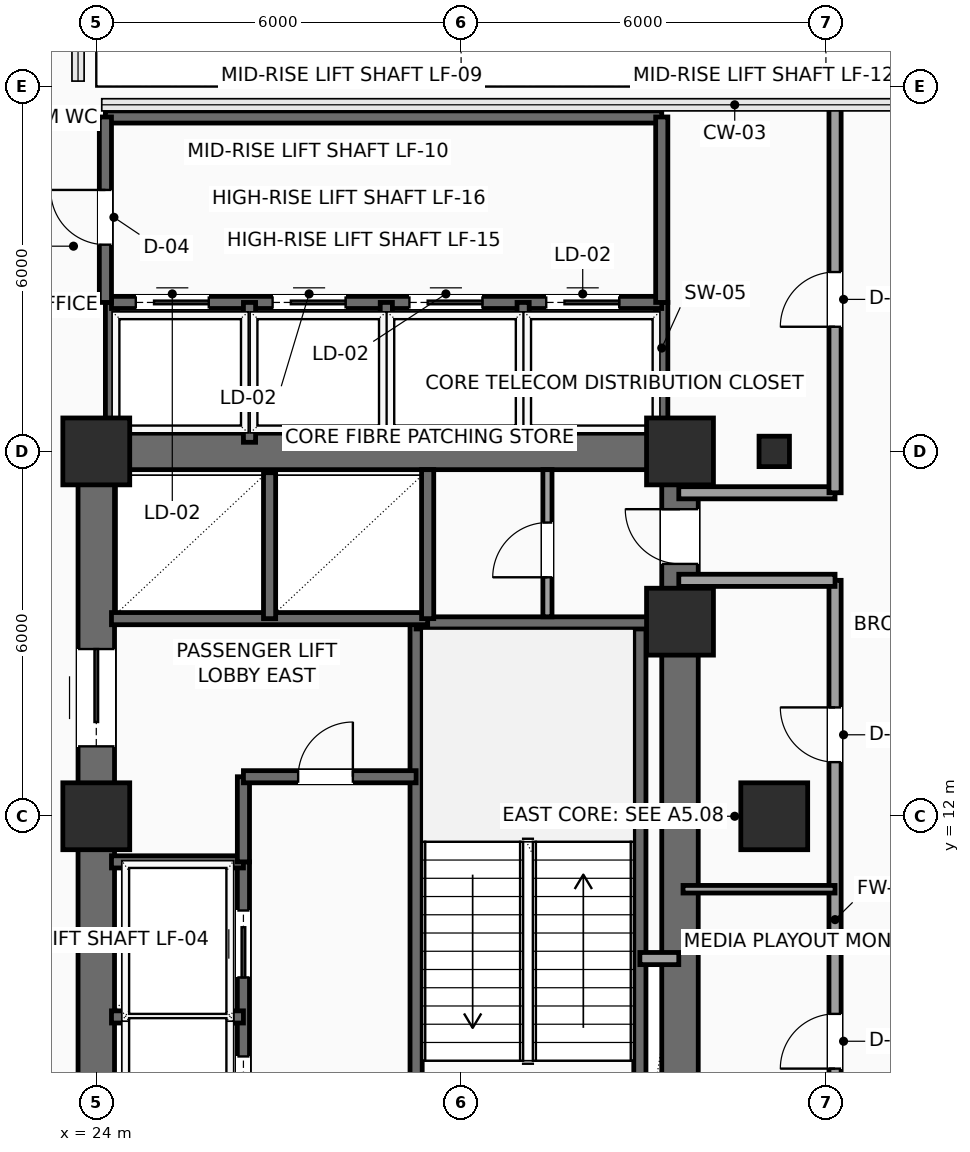
"""IFC4 building model, lengths in metres.
Left out: names, types, materials, properties, quantities, classifications, styles, units other than length and angle.
Written with IfcOpenShell. Run it as: python <this file> out.ifc"""

import sys

from ifc_helpers import new_model, si_unit, direction, frame, frame_2d, origin, origin_2d, place, context, subcontext, project, spatial, rectangle, hollow_rectangle, extrude, element, fill, save


model = new_model("IFC4")
c1 = context("Model", 3, precision=1e-05, world=origin(), true_north=direction((0.0, 1.0)))
c2 = subcontext(c1, "Body", "Model", "MODEL_VIEW")
j1 = project(units=[si_unit("LENGTHUNIT", "METRE"), si_unit("PLANEANGLEUNIT", "RADIAN")], contexts=[c1])
p1 = place(None, origin())
s1 = spatial("IfcSite", under=j1, at=p1, CompositionType="ELEMENT")
p2 = place(p1, origin())
s2 = spatial("IfcBuilding", under=s1, at=p2, CompositionType="ELEMENT")
p3 = place(p2, frame((0.0, 0.0, 153.15)))
s3 = spatial("IfcBuildingStorey", under=s2, at=p3, CompositionType="ELEMENT", Elevation=153.15)
for number, where, z_axis, x_axis in (
    (1, (24.0, 12.0, 0.0), (0.0, 0.0, 1.0), (1.0, 0.0, 0.0)),
    (2, (24.0, 18.0, 0.0), (0.0, 0.0, 1.0), (1.0, 0.0, 0.0)),
    (3, (33.6, 15.2, 0.0), (0.0, 0.0, 1.0), (1.0, 0.0, 0.0)),
    (4, (33.6, 18.0, 0.0), (0.0, 0.0, 1.0), (1.0, 0.0, 0.0)),
    (5, (35.15, 12.0, 0.0), (0.0, 0.0, 1.0), (1.0, 0.0, 0.0)),
):
    element("IfcColumn", number, at=place(p3, frame(where, z_axis=z_axis, x_axis=x_axis)), inside=s3, PredefinedType="COLUMN", context=c2, shape_type="SweptSolid", body=[
        extrude(rectangle(XDim=1.1, YDim=1.1, at=origin_2d()), origin(), (0.0, 0.0, 1.0), 3.75),
    ])
p4 = place(p3, frame((35.15, 18.0, 0.0), z_axis=(0.0, 0.0, 1.0), x_axis=(1.0, 0.0, 0.0)))
e6 = element("IfcColumn", 6, at=p4, inside=s3, PredefinedType="COLUMN", context=c2, shape_type="SweptSolid", body=[
    extrude(hollow_rectangle(XDim=0.5, YDim=0.5, WallThickness=0.025, InnerFilletRadius=0.025, OuterFilletRadius=0.04, at=origin_2d()), origin(), (0.0, 0.0, 1.0), 3.75),
])
p5 = place(p3, frame((24.0, 18.0, 0.0), z_axis=(0.0, 0.0, 1.0), x_axis=(1.0, 0.0, 0.0)))
e7 = element("IfcWall", 7, at=p5, inside=s3, PredefinedType="SHEAR", context=c2, shape_type="SweptSolid", body=[
    extrude(rectangle(XDim=9.6, YDim=0.6, at=frame_2d((4.8, 0.0))), origin(), (0.0, 0.0, 1.0), 3.525),
])
p6 = place(p3, frame((24.0, 6.0, 0.0), z_axis=(0.0, 0.0, 1.0), x_axis=(0.0, 1.0, 0.0)))
e8 = element("IfcWall", 8, at=p6, inside=s3, PredefinedType="SHEAR", context=c2, shape_type="SweptSolid", body=[
    extrude(rectangle(XDim=12.0, YDim=0.6, at=frame_2d((6.0, 0.0))), origin(), (0.0, 0.0, 1.0), 3.525),
])
p7 = place(p6, frame((7.15, 0.0, 0.0)))
e9 = element("IfcOpeningElement", 9, at=p7, cuts=e8, PredefinedType="OPENING", context=c2, shape_type="SweptSolid", body=[
    extrude(rectangle(XDim=1.6, YDim=2.3, at=frame_2d((0.8, 1.15))), frame((0.0, 0.31, 0.0), z_axis=(0.0, -1.0, 0.0), x_axis=(1.0, 0.0, 0.0)), (0.0, 0.0, 1.0), 0.62),
])
p8 = place(p3, frame((33.6, 6.0, 0.0), z_axis=(0.0, 0.0, 1.0), x_axis=(0.0, 1.0, 0.0)))
e10 = element("IfcWall", 10, at=p8, inside=s3, PredefinedType="SHEAR", context=c2, shape_type="SweptSolid", body=[
    extrude(rectangle(XDim=12.0, YDim=0.6, at=frame_2d((6.0, 0.0))), origin(), (0.0, 0.0, 1.0), 3.525),
])
p9 = place(p8, frame((10.15, 0.0, 0.0)))
e11 = element("IfcOpeningElement", 11, at=p9, cuts=e10, PredefinedType="OPENING", context=c2, shape_type="SweptSolid", body=[
    extrude(rectangle(XDim=0.9, YDim=2.15, at=frame_2d((0.45, 1.075))), frame((0.0, 0.31, 0.0), z_axis=(0.0, -1.0, 0.0), x_axis=(1.0, 0.0, 0.0)), (0.0, 0.0, 1.0), 0.62),
])
p10 = place(p3, frame((29.26, 6.3, 0.0), z_axis=(0.0, 0.0, 1.0), x_axis=(0.0, 1.0, 0.0)))
e12 = element("IfcWall", 12, at=p10, inside=s3, PredefinedType="SHEAR", context=c2, shape_type="SweptSolid", body=[
    extrude(rectangle(XDim=8.88, YDim=0.2, at=frame_2d((4.44, 0.0))), origin(), (0.0, 0.0, 1.0), 3.525),
])
p11 = place(p10, frame((0.35, 0.0, 0.0)))
e13 = element("IfcOpeningElement", 13, at=p11, cuts=e12, PredefinedType="OPENING", context=c2, shape_type="SweptSolid", body=[
    extrude(rectangle(XDim=1.1, YDim=2.2, at=frame_2d((0.55, 1.1))), frame((0.0, 0.11, 0.0), z_axis=(0.0, -1.0, 0.0), x_axis=(1.0, 0.0, 0.0)), (0.0, 0.0, 1.0), 0.22),
])
p12 = place(p3, frame((32.94, 6.3, 0.0), z_axis=(0.0, 0.0, 1.0), x_axis=(0.0, 1.0, 0.0)))
e14 = element("IfcWall", 14, at=p12, inside=s3, PredefinedType="SHEAR", context=c2, shape_type="SweptSolid", body=[
    extrude(rectangle(XDim=8.88, YDim=0.2, at=frame_2d((4.44, 0.0))), origin(), (0.0, 0.0, 1.0), 3.525),
])
p13 = place(p3, frame((29.26, 15.18, 0.0), z_axis=(0.0, 0.0, 1.0), x_axis=(1.0, 0.0, 0.0)))
e15 = element("IfcWall", 15, at=p13, inside=s3, PredefinedType="SHEAR", context=c2, shape_type="SweptSolid", body=[
    extrude(rectangle(XDim=4.04, YDim=0.2, at=frame_2d((2.02, 0.0))), origin(), (0.0, 0.0, 1.0), 3.525),
])
p14 = place(p3, frame((26.42, 6.3, 0.0), z_axis=(0.0, 0.0, 1.0), x_axis=(0.0, 1.0, 0.0)))
e16 = element("IfcWall", 16, at=p14, inside=s3, PredefinedType="SHEAR", context=c2, shape_type="SweptSolid", body=[
    extrude(rectangle(XDim=4.95, YDim=0.2, at=frame_2d((2.475, 0.0))), origin(), (0.0, 0.0, 1.0), 3.525),
])
p15 = place(p14, frame((0.65, 0.0, 0.0)))
e17 = element("IfcOpeningElement", 17, at=p15, cuts=e16, PredefinedType="OPENING", context=c2, shape_type="SweptSolid", body=[
    extrude(rectangle(XDim=1.1, YDim=2.2, at=frame_2d((0.55, 1.1))), frame((0.0, 0.11, 0.0), z_axis=(0.0, -1.0, 0.0), x_axis=(1.0, 0.0, 0.0)), (0.0, 0.0, 1.0), 0.22),
])
p16 = place(p14, frame((3.05, 0.0, 0.0)))
e18 = element("IfcOpeningElement", 18, at=p16, cuts=e16, PredefinedType="OPENING", context=c2, shape_type="SweptSolid", body=[
    extrude(rectangle(XDim=1.1, YDim=2.2, at=frame_2d((0.55, 1.1))), frame((0.0, 0.11, 0.0), z_axis=(0.0, -1.0, 0.0), x_axis=(1.0, 0.0, 0.0)), (0.0, 0.0, 1.0), 0.22),
])
for number, where, z_axis, x_axis in (
    (19, (24.25, 8.7, 0.0), (0.0, 0.0, 1.0), (1.0, 0.0, 0.0)),
    (20, (24.25, 11.25, 0.0), (0.0, 0.0, 1.0), (1.0, 0.0, 0.0)),
):
    element("IfcWall", number, at=place(p3, frame(where, z_axis=z_axis, x_axis=x_axis)), inside=s3, PredefinedType="SHEAR", context=c2, shape_type="SweptSolid", body=[
        extrude(rectangle(XDim=2.17, YDim=0.2, at=frame_2d((1.085, 0.0))), origin(), (0.0, 0.0, 1.0), 3.525),
    ])
p17 = place(p3, frame((26.42, 11.25, 0.0), z_axis=(0.0, 0.0, 1.0), x_axis=(0.0, 1.0, 0.0)))
e21 = element("IfcWall", 21, at=p17, inside=s3, PredefinedType="SHEAR", context=c2, shape_type="SweptSolid", body=[
    extrude(rectangle(XDim=1.4, YDim=0.2, at=frame_2d((0.7, 0.0))), origin(), (0.0, 0.0, 1.0), 3.525),
])
p18 = place(p3, frame((26.42, 12.65, 0.0), z_axis=(0.0, 0.0, 1.0), x_axis=(1.0, 0.0, 0.0)))
e22 = element("IfcWall", 22, at=p18, inside=s3, PredefinedType="SHEAR", context=c2, shape_type="SweptSolid", body=[
    extrude(rectangle(XDim=2.84, YDim=0.2, at=frame_2d((1.42, 0.0))), origin(), (0.0, 0.0, 1.0), 3.525),
])
p19 = place(p18, frame((0.9, 0.0, 0.0)))
e23 = element("IfcOpeningElement", 23, at=p19, cuts=e22, PredefinedType="OPENING", context=c2, shape_type="SweptSolid", body=[
    extrude(rectangle(XDim=0.9, YDim=2.15, at=frame_2d((0.45, 1.075))), frame((0.0, 0.11, 0.0), z_axis=(0.0, -1.0, 0.0), x_axis=(1.0, 0.0, 0.0)), (0.0, 0.0, 1.0), 0.22),
])
p20 = place(p3, frame((32.94, 9.66, 0.0), z_axis=(0.0, 0.0, 1.0), x_axis=(1.0, 0.0, 0.0)))
e24 = element("IfcWall", 24, at=p20, inside=s3, PredefinedType="SOLIDWALL", context=c2, shape_type="SweptSolid", body=[
    extrude(rectangle(XDim=0.64, YDim=0.2, at=frame_2d((0.32, 0.0))), origin(), (0.0, 0.0, 1.0), 3.525),
])
p21 = place(p3, frame((24.25, 15.25, 0.0), z_axis=(0.0, 0.0, 1.0), x_axis=(1.0, 0.0, 0.0)))
e25 = element("IfcWall", 25, at=p21, inside=s3, PredefinedType="SHEAR", context=c2, shape_type="SweptSolid", body=[
    extrude(rectangle(XDim=5.2, YDim=0.2, at=frame_2d((2.6, 0.0))), origin(), (0.0, 0.0, 1.0), 3.525),
])
p22 = place(p3, frame((26.85, 15.25, 0.0), z_axis=(0.0, 0.0, 1.0), x_axis=(0.0, 1.0, 0.0)))
e26 = element("IfcWall", 26, at=p22, inside=s3, PredefinedType="SHEAR", context=c2, shape_type="SweptSolid", body=[
    extrude(rectangle(XDim=2.4, YDim=0.2, at=frame_2d((1.2, 0.0))), origin(), (0.0, 0.0, 1.0), 3.525),
])
p23 = place(p3, frame((29.45, 15.25, 0.0), z_axis=(0.0, 0.0, 1.0), x_axis=(0.0, 1.0, 0.0)))
e27 = element("IfcWall", 27, at=p23, inside=s3, PredefinedType="SHEAR", context=c2, shape_type="SweptSolid", body=[
    extrude(rectangle(XDim=2.45, YDim=0.2, at=frame_2d((1.225, 0.0))), origin(), (0.0, 0.0, 1.0), 3.525),
])
p24 = place(p3, frame((31.42, 15.28, 0.0), z_axis=(0.0, 0.0, 1.0), x_axis=(0.0, 1.0, 0.0)))
e28 = element("IfcWall", 28, at=p24, inside=s3, PredefinedType="PARTITIONING", context=c2, shape_type="SweptSolid", body=[
    extrude(rectangle(XDim=2.42, YDim=0.15, at=frame_2d((1.21, 0.0))), origin(), (0.0, 0.0, 1.0), 3.525),
])
p25 = place(p24, frame((0.65, 0.0, 0.0)))
e29 = element("IfcOpeningElement", 29, at=p25, cuts=e28, PredefinedType="OPENING", context=c2, shape_type="SweptSolid", body=[
    extrude(rectangle(XDim=0.9, YDim=2.15, at=frame_2d((0.45, 1.075))), frame((0.0, 0.085, 0.0), z_axis=(0.0, -1.0, 0.0), x_axis=(1.0, 0.0, 0.0)), (0.0, 0.0, 1.0), 0.17),
])
for number, where, z_axis, x_axis in (
    (30, (33.3, 18.1, 0.0), (0.0, 0.0, 1.0), (0.0, 1.0, 0.0)),
    (31, (24.25, 18.1, 0.0), (0.0, 0.0, 1.0), (0.0, 1.0, 0.0)),
):
    element("IfcWall", number, at=place(p3, frame(where, z_axis=z_axis, x_axis=x_axis)), inside=s3, PredefinedType="SHEAR", context=c2, shape_type="SweptSolid", body=[
        extrude(rectangle(XDim=2.35, YDim=0.2, at=frame_2d((1.175, 0.0))), origin(), (0.0, 0.0, 1.0), 3.525),
    ])
p26 = place(p3, frame((24.25, 20.45, 0.0), z_axis=(0.0, 0.0, 1.0), x_axis=(1.0, 0.0, 0.0)))
e32 = element("IfcWall", 32, at=p26, inside=s3, PredefinedType="SHEAR", context=c2, shape_type="SweptSolid", body=[
    extrude(rectangle(XDim=9.05, YDim=0.2, at=frame_2d((4.525, 0.0))), origin(), (0.0, 0.0, 1.0), 3.525),
])
p27 = place(p26, frame((0.4, 0.0, 0.0)))
e33 = element("IfcOpeningElement", 33, at=p27, cuts=e32, PredefinedType="OPENING", context=c2, shape_type="SweptSolid", body=[
    extrude(rectangle(XDim=1.2, YDim=2.2, at=frame_2d((0.6, 1.1))), frame((0.0, 0.11, 0.0), z_axis=(0.0, -1.0, 0.0), x_axis=(1.0, 0.0, 0.0)), (0.0, 0.0, 1.0), 0.22),
])
p28 = place(p26, frame((2.65, 0.0, 0.0)))
e34 = element("IfcOpeningElement", 34, at=p28, cuts=e32, PredefinedType="OPENING", context=c2, shape_type="SweptSolid", body=[
    extrude(rectangle(XDim=1.2, YDim=2.2, at=frame_2d((0.6, 1.1))), frame((0.0, 0.11, 0.0), z_axis=(0.0, -1.0, 0.0), x_axis=(1.0, 0.0, 0.0)), (0.0, 0.0, 1.0), 0.22),
])
p29 = place(p26, frame((4.9, 0.0, 0.0)))
e35 = element("IfcOpeningElement", 35, at=p29, cuts=e32, PredefinedType="OPENING", context=c2, shape_type="SweptSolid", body=[
    extrude(rectangle(XDim=1.2, YDim=2.2, at=frame_2d((0.6, 1.1))), frame((0.0, 0.11, 0.0), z_axis=(0.0, -1.0, 0.0), x_axis=(1.0, 0.0, 0.0)), (0.0, 0.0, 1.0), 0.22),
])
p30 = place(p26, frame((7.15, 0.0, 0.0)))
e36 = element("IfcOpeningElement", 36, at=p30, cuts=e32, PredefinedType="OPENING", context=c2, shape_type="SweptSolid", body=[
    extrude(rectangle(XDim=1.2, YDim=2.2, at=frame_2d((0.6, 1.1))), frame((0.0, 0.11, 0.0), z_axis=(0.0, -1.0, 0.0), x_axis=(1.0, 0.0, 0.0)), (0.0, 0.0, 1.0), 0.22),
])
for number, where, z_axis, x_axis in (
    (37, (26.52, 18.15, 0.0), (0.0, 0.0, 1.0), (0.0, 1.0, 0.0)),
    (38, (28.77, 18.15, 0.0), (0.0, 0.0, 1.0), (0.0, 1.0, 0.0)),
    (39, (31.02, 18.15, 0.0), (0.0, 0.0, 1.0), (0.0, 1.0, 0.0)),
):
    element("IfcWall", number, at=place(p3, frame(where, z_axis=z_axis, x_axis=x_axis)), inside=s3, PredefinedType="SHEAR", context=c2, shape_type="SweptSolid", body=[
        extrude(rectangle(XDim=2.3, YDim=0.2, at=frame_2d((1.15, 0.0))), origin(), (0.0, 0.0, 1.0), 3.525),
    ])
p31 = place(p3, frame((24.15, 23.5, 0.0), z_axis=(0.0, 0.0, 1.0), x_axis=(1.0, 0.0, 0.0)))
e40 = element("IfcWall", 40, at=p31, inside=s3, PredefinedType="SHEAR", context=c2, shape_type="SweptSolid", body=[
    extrude(rectangle(XDim=9.15, YDim=0.2, at=frame_2d((4.575, 0.0))), origin(), (0.0, 0.0, 1.0), 3.525),
])
p32 = place(p3, frame((33.3, 20.45, 0.0), z_axis=(0.0, 0.0, 1.0), x_axis=(0.0, 1.0, 0.0)))
e41 = element("IfcWall", 41, at=p32, inside=s3, PredefinedType="SHEAR", context=c2, shape_type="SweptSolid", body=[
    extrude(rectangle(XDim=3.05, YDim=0.2, at=frame_2d((1.525, 0.0))), origin(), (0.0, 0.0, 1.0), 3.525),
])
p33 = place(p3, frame((24.15, 20.45, 0.0), z_axis=(0.0, 0.0, 1.0), x_axis=(0.0, 1.0, 0.0)))
e42 = element("IfcWall", 42, at=p33, inside=s3, PredefinedType="SHEAR", context=c2, shape_type="SweptSolid", body=[
    extrude(rectangle(XDim=3.05, YDim=0.2, at=frame_2d((1.525, 0.0))), origin(), (0.0, 0.0, 1.0), 3.525),
])
p34 = place(p33, frame((0.95, 0.0, 0.0)))
e43 = element("IfcOpeningElement", 43, at=p34, cuts=e42, PredefinedType="OPENING", context=c2, shape_type="SweptSolid", body=[
    extrude(rectangle(XDim=0.9, YDim=2.15, at=frame_2d((0.45, 1.075))), frame((0.0, 0.11, 0.0), z_axis=(0.0, -1.0, 0.0), x_axis=(1.0, 0.0, 0.0)), (0.0, 0.0, 1.0), 0.22),
])
p35 = place(p3, frame((36.15, 5.8, 0.0), z_axis=(0.0, 0.0, 1.0), x_axis=(0.0, 1.0, 0.0)))
e44 = element("IfcWall", 44, at=p35, inside=s3, PredefinedType="SOLIDWALL", context=c2, shape_type="SweptSolid", body=[
    extrude(rectangle(XDim=10.08, YDim=0.2, at=frame_2d((5.04, 0.0))), origin(), (0.0, 0.0, 1.0), 3.525),
])
p36 = place(p35, frame((2.05, 0.0, 0.0)))
e45 = element("IfcOpeningElement", 45, at=p36, cuts=e44, PredefinedType="OPENING", context=c2, shape_type="SweptSolid", body=[
    extrude(rectangle(XDim=0.9, YDim=2.1, at=frame_2d((0.45, 1.05))), frame((0.0, 0.11, 0.0), z_axis=(0.0, -1.0, 0.0), x_axis=(1.0, 0.0, 0.0)), (0.0, 0.0, 1.0), 0.22),
])
p37 = place(p35, frame((7.09, 0.0, 0.0)))
e46 = element("IfcOpeningElement", 46, at=p37, cuts=e44, PredefinedType="OPENING", context=c2, shape_type="SweptSolid", body=[
    extrude(rectangle(XDim=0.9, YDim=2.1, at=frame_2d((0.45, 1.05))), frame((0.0, 0.11, 0.0), z_axis=(0.0, -1.0, 0.0), x_axis=(1.0, 0.0, 0.0)), (0.0, 0.0, 1.0), 0.22),
])
for number, where, z_axis, x_axis in (
    (47, (36.15, 15.88, 0.0), (0.0, 0.0, 1.0), (-1.0, 0.0, 0.0)),
    (48, (33.58, 17.32, 0.0), (0.0, 0.0, 1.0), (1.0, 0.0, 0.0)),
):
    element("IfcWall", number, at=place(p3, frame(where, z_axis=z_axis, x_axis=x_axis)), inside=s3, PredefinedType="SOLIDWALL", context=c2, shape_type="SweptSolid", body=[
        extrude(rectangle(XDim=2.57, YDim=0.2, at=frame_2d((1.285, 0.0))), origin(), (0.0, 0.0, 1.0), 3.525),
    ])
p38 = place(p3, frame((36.15, 17.32, 0.0), z_axis=(0.0, 0.0, 1.0), x_axis=(0.0, 1.0, 0.0)))
e49 = element("IfcWall", 49, at=p38, inside=s3, PredefinedType="SOLIDWALL", context=c2, shape_type="SweptSolid", body=[
    extrude(rectangle(XDim=6.38, YDim=0.2, at=frame_2d((3.19, 0.0))), origin(), (0.0, 0.0, 1.0), 3.525),
])
p39 = place(p38, frame((2.73, 0.0, 0.0)))
e50 = element("IfcOpeningElement", 50, at=p39, cuts=e49, PredefinedType="OPENING", context=c2, shape_type="SweptSolid", body=[
    extrude(rectangle(XDim=0.9, YDim=2.1, at=frame_2d((0.45, 1.05))), frame((0.0, 0.11, 0.0), z_axis=(0.0, -1.0, 0.0), x_axis=(1.0, 0.0, 0.0)), (0.0, 0.0, 1.0), 0.22),
])
p40 = place(p3, frame((33.65, 10.8, 0.0), z_axis=(0.0, 0.0, 1.0), x_axis=(1.0, 0.0, 0.0)))
e51 = element("IfcWall", 51, at=p40, inside=s3, PredefinedType="PARTITIONING", context=c2, shape_type="SweptSolid", body=[
    extrude(rectangle(XDim=2.5, YDim=0.125, at=frame_2d((1.25, 0.0))), origin(), (0.0, 0.0, 1.0), 3.525),
])
p41 = place(p7, origin())
e52 = element("IfcDoor", 52, at=p41, inside=s3, OperationType="DOUBLE_DOOR_SLIDING", PredefinedType="DOOR", context=c2, shape_type="SweptSolid", body=[
    extrude(rectangle(XDim=1.6, YDim=2.3, at=frame_2d((0.8, 1.15))), frame((0.0, 0.025, 0.0), z_axis=(0.0, -1.0, 0.0), x_axis=(1.0, 0.0, 0.0)), (0.0, 0.0, 1.0), 0.05),
])
fill(e9, e52)
p42 = place(p9, origin())
e53 = element("IfcDoor", 53, at=p42, inside=s3, OperationType="SINGLE_SWING_RIGHT", PredefinedType="DOOR", context=c2, shape_type="SweptSolid", body=[
    extrude(rectangle(XDim=0.9, YDim=2.15, at=frame_2d((0.45, 1.075))), frame((0.0, 0.025, 0.0), z_axis=(0.0, -1.0, 0.0), x_axis=(1.0, 0.0, 0.0)), (0.0, 0.0, 1.0), 0.05),
])
fill(e11, e53)
p43 = place(p15, origin())
e54 = element("IfcDoor", 54, at=p43, inside=s3, OperationType="SLIDING_TO_LEFT", PredefinedType="DOOR", context=c2, shape_type="SweptSolid", body=[
    extrude(rectangle(XDim=1.1, YDim=2.2, at=frame_2d((0.55, 1.1))), frame((0.0, 0.025, 0.0), z_axis=(0.0, -1.0, 0.0), x_axis=(1.0, 0.0, 0.0)), (0.0, 0.0, 1.0), 0.05),
])
fill(e17, e54)
p44 = place(p16, origin())
e55 = element("IfcDoor", 55, at=p44, inside=s3, OperationType="SLIDING_TO_LEFT", PredefinedType="DOOR", context=c2, shape_type="SweptSolid", body=[
    extrude(rectangle(XDim=1.1, YDim=2.2, at=frame_2d((0.55, 1.1))), frame((0.0, 0.025, 0.0), z_axis=(0.0, -1.0, 0.0), x_axis=(1.0, 0.0, 0.0)), (0.0, 0.0, 1.0), 0.05),
])
fill(e18, e55)
p45 = place(p19, origin())
e56 = element("IfcDoor", 56, at=p45, inside=s3, OperationType="SINGLE_SWING_RIGHT", PredefinedType="DOOR", context=c2, shape_type="SweptSolid", body=[
    extrude(rectangle(XDim=0.9, YDim=2.15, at=frame_2d((0.45, 1.075))), frame((0.0, 0.025, 0.0), z_axis=(0.0, -1.0, 0.0), x_axis=(1.0, 0.0, 0.0)), (0.0, 0.0, 1.0), 0.05),
])
fill(e23, e56)
p46 = place(p25, origin())
e57 = element("IfcDoor", 57, at=p46, inside=s3, OperationType="SINGLE_SWING_LEFT", PredefinedType="DOOR", context=c2, shape_type="SweptSolid", body=[
    extrude(rectangle(XDim=0.9, YDim=2.15, at=frame_2d((0.45, 1.075))), frame((0.0, 0.025, 0.0), z_axis=(0.0, -1.0, 0.0), x_axis=(1.0, 0.0, 0.0)), (0.0, 0.0, 1.0), 0.05),
])
fill(e29, e57)
p47 = place(p27, origin())
e58 = element("IfcDoor", 58, at=p47, inside=s3, OperationType="SLIDING_TO_RIGHT", PredefinedType="DOOR", context=c2, shape_type="SweptSolid", body=[
    extrude(rectangle(XDim=1.2, YDim=2.2, at=frame_2d((0.6, 1.1))), frame((0.0, 0.025, 0.0), z_axis=(0.0, -1.0, 0.0), x_axis=(1.0, 0.0, 0.0)), (0.0, 0.0, 1.0), 0.05),
])
fill(e33, e58)
p48 = place(p28, origin())
e59 = element("IfcDoor", 59, at=p48, inside=s3, OperationType="SLIDING_TO_RIGHT", PredefinedType="DOOR", context=c2, shape_type="SweptSolid", body=[
    extrude(rectangle(XDim=1.2, YDim=2.2, at=frame_2d((0.6, 1.1))), frame((0.0, 0.025, 0.0), z_axis=(0.0, -1.0, 0.0), x_axis=(1.0, 0.0, 0.0)), (0.0, 0.0, 1.0), 0.05),
])
fill(e34, e59)
p49 = place(p29, origin())
e60 = element("IfcDoor", 60, at=p49, inside=s3, OperationType="SLIDING_TO_RIGHT", PredefinedType="DOOR", context=c2, shape_type="SweptSolid", body=[
    extrude(rectangle(XDim=1.2, YDim=2.2, at=frame_2d((0.6, 1.1))), frame((0.0, 0.025, 0.0), z_axis=(0.0, -1.0, 0.0), x_axis=(1.0, 0.0, 0.0)), (0.0, 0.0, 1.0), 0.05),
])
fill(e35, e60)
p50 = place(p30, origin())
e61 = element("IfcDoor", 61, at=p50, inside=s3, OperationType="SLIDING_TO_RIGHT", PredefinedType="DOOR", context=c2, shape_type="SweptSolid", body=[
    extrude(rectangle(XDim=1.2, YDim=2.2, at=frame_2d((0.6, 1.1))), frame((0.0, 0.025, 0.0), z_axis=(0.0, -1.0, 0.0), x_axis=(1.0, 0.0, 0.0)), (0.0, 0.0, 1.0), 0.05),
])
fill(e36, e61)
p51 = place(p34, origin())
e62 = element("IfcDoor", 62, at=p51, inside=s3, OperationType="SINGLE_SWING_RIGHT", PredefinedType="DOOR", context=c2, shape_type="SweptSolid", body=[
    extrude(rectangle(XDim=0.9, YDim=2.15, at=frame_2d((0.45, 1.075))), frame((0.0, 0.025, 0.0), z_axis=(0.0, -1.0, 0.0), x_axis=(1.0, 0.0, 0.0)), (0.0, 0.0, 1.0), 0.05),
])
fill(e43, e62)
p52 = place(p36, origin())
e63 = element("IfcDoor", 63, at=p52, inside=s3, OperationType="SINGLE_SWING_LEFT", PredefinedType="DOOR", context=c2, shape_type="SweptSolid", body=[
    extrude(rectangle(XDim=0.9, YDim=2.1, at=frame_2d((0.45, 1.05))), frame((0.0, 0.025, 0.0), z_axis=(0.0, -1.0, 0.0), x_axis=(1.0, 0.0, 0.0)), (0.0, 0.0, 1.0), 0.05),
])
fill(e45, e63)
p53 = place(p37, origin())
e64 = element("IfcDoor", 64, at=p53, inside=s3, OperationType="SINGLE_SWING_RIGHT", PredefinedType="DOOR", context=c2, shape_type="SweptSolid", body=[
    extrude(rectangle(XDim=0.9, YDim=2.1, at=frame_2d((0.45, 1.05))), frame((0.0, 0.025, 0.0), z_axis=(0.0, -1.0, 0.0), x_axis=(1.0, 0.0, 0.0)), (0.0, 0.0, 1.0), 0.05),
])
fill(e46, e64)
p54 = place(p39, origin())
e65 = element("IfcDoor", 65, at=p54, inside=s3, OperationType="SINGLE_SWING_LEFT", PredefinedType="DOOR", context=c2, shape_type="SweptSolid", body=[
    extrude(rectangle(XDim=0.9, YDim=2.1, at=frame_2d((0.45, 1.05))), frame((0.0, 0.025, 0.0), z_axis=(0.0, -1.0, 0.0), x_axis=(1.0, 0.0, 0.0)), (0.0, 0.0, 1.0), 0.05),
])
fill(e50, e65)
save(model, sys.argv[1])
